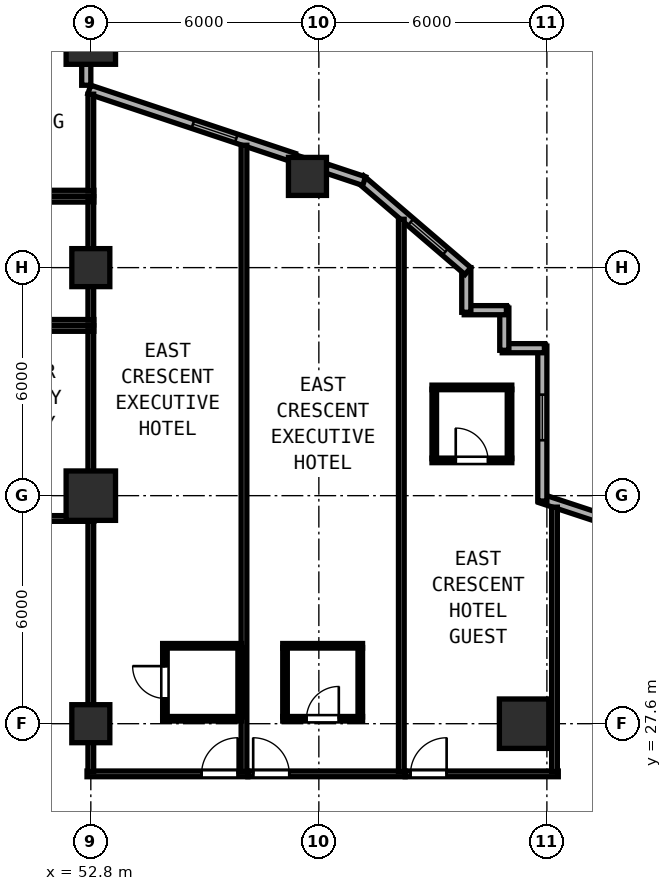
"""IFC4 building model, lengths in metres.
Left out: names, types, materials, properties, quantities, classifications, styles, units other than length and angle.
Written with IfcOpenShell. Run it as: python <this file> out.ifc"""

import sys

from ifc_helpers import new_model, si_unit, direction, frame, frame_2d, origin, origin_2d, place, context, subcontext, project, spatial, rectangle, hollow_rectangle, extrude, element, fill, save


model = new_model("IFC4")
c1 = context("Model", 3, precision=1e-05, world=origin(), true_north=direction((0.0, 1.0)))
c2 = subcontext(c1, "Body", "Model", "MODEL_VIEW")
j1 = project(units=[si_unit("LENGTHUNIT", "METRE"), si_unit("PLANEANGLEUNIT", "RADIAN")], contexts=[c1])
p1 = place(None, origin())
s1 = spatial("IfcSite", under=j1, at=p1, CompositionType="ELEMENT")
p2 = place(p1, origin())
s2 = spatial("IfcBuilding", under=s1, at=p2, CompositionType="ELEMENT")
p3 = place(p2, frame((0.0, 0.0, 39.2)))
s3 = spatial("IfcBuildingStorey", under=s2, at=p3, CompositionType="ELEMENT", Elevation=39.2)
for number, where, z_axis, x_axis in (
    (1, (52.8, 33.6, 0.0), (0.0, 0.0, 1.0), (1.0, 0.0, 0.0)),
    (2, (52.8, 45.6, 0.0), (0.0, 0.0, 1.0), (1.0, 0.0, 0.0)),
    (3, (64.2, 27.6, 0.0), (0.0, 0.0, 1.0), (1.0, 0.0, 0.0)),
):
    element("IfcColumn", number, at=place(p3, frame(where, z_axis=z_axis, x_axis=x_axis)), inside=s3, PredefinedType="COLUMN", context=c2, shape_type="SweptSolid", body=[
        extrude(hollow_rectangle(XDim=1.3, YDim=1.3, WallThickness=0.048, at=origin_2d()), origin(), (0.0, 0.0, 1.0), 3.8),
    ])
for number, where, z_axis, x_axis in (
    (4, (52.8, 27.6, 0.0), (0.0, 0.0, 1.0), (1.0, 0.0, 0.0)),
    (5, (52.8, 39.6, 0.0), (0.0, 0.0, 1.0), (1.0, 0.0, 0.0)),
    (6, (58.5, 42.0, 0.0), (0.0, 0.0, 1.0), (1.0, 0.0, 0.0)),
):
    element("IfcColumn", number, at=place(p3, frame(where, z_axis=z_axis, x_axis=x_axis)), inside=s3, PredefinedType="COLUMN", context=c2, shape_type="SweptSolid", body=[
        extrude(hollow_rectangle(XDim=1.0, YDim=1.0, WallThickness=0.038, at=origin_2d()), origin(), (0.0, 0.0, 1.0), 3.8),
    ])
p4 = place(p3, frame((72.065, 31.079, 0.0), z_axis=(0.0, 0.0, 1.0), x_axis=(-0.949719438711, 0.313102200144, 0.0)))
e7 = element("IfcWall", 7, at=p4, inside=s3, PredefinedType="SOLIDWALL", context=c2, shape_type="SweptSolid", body=[
    extrude(rectangle(XDim=7.831, YDim=0.24, at=frame_2d((3.916, 0.0))), origin(), (0.0, 0.0, 1.0), 3.54),
])
p5 = place(p4, frame((1.6, 0.0, 0.85)))
e8 = element("IfcOpeningElement", 8, at=p5, cuts=e7, PredefinedType="OPENING", context=c2, shape_type="SweptSolid", body=[
    extrude(rectangle(XDim=1.2, YDim=1.85, at=frame_2d((0.6, 0.925))), frame((0.0, 0.13, 0.0), z_axis=(0.0, -1.0, 0.0), x_axis=(1.0, 0.0, 0.0)), (0.0, 0.0, 1.0), 0.26),
])
p6 = place(p3, frame((64.68, 33.458, 0.0), z_axis=(0.0, 0.0, 1.0), x_axis=(0.0, 1.0, 0.0)))
e9 = element("IfcWall", 9, at=p6, inside=s3, PredefinedType="SOLIDWALL", context=c2, shape_type="SweptSolid", body=[
    extrude(rectangle(XDim=4.077, YDim=0.24, at=frame_2d((2.038, 0.0))), origin(), (0.0, 0.0, 1.0), 3.54),
])
p7 = place(p6, frame((1.6, 0.0, 0.85)))
e10 = element("IfcOpeningElement", 10, at=p7, cuts=e9, PredefinedType="OPENING", context=c2, shape_type="SweptSolid", body=[
    extrude(rectangle(XDim=1.2, YDim=1.85, at=frame_2d((0.6, 0.925))), frame((0.0, 0.13, 0.0), z_axis=(0.0, -1.0, 0.0), x_axis=(1.0, 0.0, 0.0)), (0.0, 0.0, 1.0), 0.26),
])
p8 = place(p3, frame((64.735, 37.48, 0.0), z_axis=(0.0, 0.0, 1.0), x_axis=(-1.0, 0.0, 0.0)))
e11 = element("IfcWall", 11, at=p8, inside=s3, PredefinedType="SOLIDWALL", context=c2, shape_type="SweptSolid", body=[
    extrude(rectangle(XDim=1.11, YDim=0.24, at=frame_2d((0.555, 0.0))), origin(), (0.0, 0.0, 1.0), 3.54),
])
p9 = place(p3, frame((63.68, 37.425, 0.0), z_axis=(0.0, 0.0, 1.0), x_axis=(0.0, 1.0, 0.0)))
e12 = element("IfcWall", 12, at=p9, inside=s3, PredefinedType="SOLIDWALL", context=c2, shape_type="SweptSolid", body=[
    extrude(rectangle(XDim=1.11, YDim=0.24, at=frame_2d((0.555, 0.0))), origin(), (0.0, 0.0, 1.0), 3.54),
])
p10 = place(p3, frame((63.735, 38.48, 0.0), z_axis=(0.0, 0.0, 1.0), x_axis=(-1.0, 0.0, 0.0)))
e13 = element("IfcWall", 13, at=p10, inside=s3, PredefinedType="SOLIDWALL", context=c2, shape_type="SweptSolid", body=[
    extrude(rectangle(XDim=1.11, YDim=0.24, at=frame_2d((0.555, 0.0))), origin(), (0.0, 0.0, 1.0), 3.54),
])
p11 = place(p3, frame((62.68, 38.425, 0.0), z_axis=(0.0, 0.0, 1.0), x_axis=(0.0, 1.0, 0.0)))
e14 = element("IfcWall", 14, at=p11, inside=s3, PredefinedType="SOLIDWALL", context=c2, shape_type="SweptSolid", body=[
    extrude(rectangle(XDim=1.175, YDim=0.24, at=frame_2d((0.587, 0.0))), origin(), (0.0, 0.0, 1.0), 3.54),
])
p12 = place(p3, frame((62.722, 39.509, 0.0), z_axis=(0.0, 0.0, 1.0), x_axis=(-0.759247334792, 0.650802185469, 0.0)))
e15 = element("IfcWall", 15, at=p12, inside=s3, PredefinedType="SOLIDWALL", context=c2, shape_type="SweptSolid", body=[
    extrude(rectangle(XDim=3.719, YDim=0.24, at=frame_2d((1.86, 0.0))), origin(), (0.0, 0.0, 1.0), 3.54),
])
p13 = place(p12, frame((0.782, 0.0, 0.85)))
e16 = element("IfcOpeningElement", 16, at=p13, cuts=e15, PredefinedType="OPENING", context=c2, shape_type="SweptSolid", body=[
    extrude(rectangle(XDim=1.2, YDim=1.85, at=frame_2d((0.6, 0.925))), frame((0.0, 0.13, 0.0), z_axis=(0.0, -1.0, 0.0), x_axis=(1.0, 0.0, 0.0)), (0.0, 0.0, 1.0), 0.26),
])
p14 = place(p3, frame((59.992, 41.876, 0.0), z_axis=(0.0, 0.0, 1.0), x_axis=(-0.948706457285, 0.316158279832, 0.0)))
e17 = element("IfcWall", 17, at=p14, inside=s3, PredefinedType="SOLIDWALL", context=c2, shape_type="SweptSolid", body=[
    extrude(rectangle(XDim=1.054, YDim=0.24, at=frame_2d((0.527, 0.0))), origin(), (0.0, 0.0, 1.0), 3.54),
])
p15 = place(p3, frame((58.145, 42.492, 0.0), z_axis=(0.0, 0.0, 1.0), x_axis=(-0.948683298051, 0.316227766017, 0.0)))
e18 = element("IfcWall", 18, at=p15, inside=s3, PredefinedType="SOLIDWALL", context=c2, shape_type="SweptSolid", body=[
    extrude(rectangle(XDim=5.675, YDim=0.24, at=frame_2d((2.838, 0.0))), origin(), (0.0, 0.0, 1.0), 3.037),
])
p16 = place(p15, frame((1.6, 0.0, 0.85)))
e19 = element("IfcOpeningElement", 19, at=p16, cuts=e18, PredefinedType="OPENING", context=c2, shape_type="SweptSolid", body=[
    extrude(rectangle(XDim=1.2, YDim=1.85, at=frame_2d((0.6, 0.925))), frame((0.0, 0.13, 0.0), z_axis=(0.0, -1.0, 0.0), x_axis=(1.0, 0.0, 0.0)), (0.0, 0.0, 1.0), 0.26),
])
p17 = place(p3, frame((52.68, 44.398, 0.0), z_axis=(0.0, 0.0, 1.0), x_axis=(0.0, 1.0, 0.0)))
e20 = element("IfcWall", 20, at=p17, inside=s3, PredefinedType="SOLIDWALL", context=c2, shape_type="SweptSolid", body=[
    extrude(rectangle(XDim=0.56, YDim=0.24, at=frame_2d((0.28, 0.0))), origin(), (0.0, 0.0, 1.0), 3.037),
])
for number, where, z_axis, x_axis in (
    (21, (49.08, 38.0, 0.0), (0.0, 0.0, 1.0), (1.0, 0.0, 0.0)),
    (22, (49.08, 33.0, 0.0), (0.0, 0.0, 1.0), (1.0, 0.0, 0.0)),
):
    element("IfcWall", number, at=place(p3, frame(where, z_axis=z_axis, x_axis=x_axis)), inside=s3, PredefinedType="PARTITIONING", context=c2, shape_type="SweptSolid", body=[
        extrude(rectangle(XDim=3.8, YDim=0.15, at=frame_2d((1.9, 0.0))), origin(), (0.0, 0.0, 1.0), 3.54),
    ])
p18 = place(p3, frame((52.8, 33.06, 0.0), z_axis=(0.0, 0.0, 1.0), x_axis=(0.0, 1.0, 0.0)))
e23 = element("IfcWall", 23, at=p18, inside=s3, PredefinedType="PARTITIONING", context=c2, shape_type="SweptSolid", body=[
    extrude(rectangle(XDim=4.88, YDim=0.15, at=frame_2d((2.44, 0.0))), origin(), (0.0, 0.0, 1.0), 3.037),
])
for number, where, z_axis, x_axis in (
    (24, (49.08, 41.4, 0.0), (0.0, 0.0, 1.0), (1.0, 0.0, 0.0)),
    (25, (49.08, 38.16, 0.0), (0.0, 0.0, 1.0), (1.0, 0.0, 0.0)),
):
    element("IfcWall", number, at=place(p3, frame(where, z_axis=z_axis, x_axis=x_axis)), inside=s3, PredefinedType="PARTITIONING", context=c2, shape_type="SweptSolid", body=[
        extrude(rectangle(XDim=3.8, YDim=0.15, at=frame_2d((1.9, 0.0))), origin(), (0.0, 0.0, 1.0), 3.54),
    ])
p19 = place(p3, frame((52.8, 38.22, 0.0), z_axis=(0.0, 0.0, 1.0), x_axis=(0.0, 1.0, 0.0)))
e26 = element("IfcWall", 26, at=p19, inside=s3, PredefinedType="PARTITIONING", context=c2, shape_type="SweptSolid", body=[
    extrude(rectangle(XDim=3.12, YDim=0.15, at=frame_2d((1.56, 0.0))), origin(), (0.0, 0.0, 1.0), 3.037),
])
p20 = place(p3, frame((49.08, 41.56, 0.0), z_axis=(0.0, 0.0, 1.0), x_axis=(1.0, 0.0, 0.0)))
e27 = element("IfcWall", 27, at=p20, inside=s3, PredefinedType="PARTITIONING", context=c2, shape_type="SweptSolid", body=[
    extrude(rectangle(XDim=3.8, YDim=0.15, at=frame_2d((1.9, 0.0))), origin(), (0.0, 0.0, 1.0), 3.54),
])
p21 = place(p3, frame((52.8, 41.62, 0.0), z_axis=(0.0, 0.0, 1.0), x_axis=(0.0, 1.0, 0.0)))
e28 = element("IfcWall", 28, at=p21, inside=s3, PredefinedType="PARTITIONING", context=c2, shape_type="SweptSolid", body=[
    extrude(rectangle(XDim=2.543, YDim=0.15, at=frame_2d((1.271, 0.0))), origin(), (0.0, 0.0, 1.0), 3.037),
])
p22 = place(p3, frame((52.7, 26.28, 0.0), z_axis=(0.0, 0.0, 1.0), x_axis=(1.0, 0.0, 0.0)))
e29 = element("IfcWall", 29, at=p22, inside=s3, PredefinedType="PARTITIONING", context=c2, shape_type="SweptSolid", body=[
    extrude(rectangle(XDim=4.23, YDim=0.15, at=frame_2d((2.115, 0.0))), origin(), (0.0, 0.0, 1.0), 3.54),
])
p23 = place(p22, frame((3.014, 0.0, 0.0)))
e30 = element("IfcOpeningElement", 30, at=p23, cuts=e29, PredefinedType="OPENING", context=c2, shape_type="SweptSolid", body=[
    extrude(rectangle(XDim=0.95, YDim=2.18, at=frame_2d((0.475, 1.09))), frame((0.0, 0.085, 0.0), z_axis=(0.0, -1.0, 0.0), x_axis=(1.0, 0.0, 0.0)), (0.0, 0.0, 1.0), 0.17),
])
p24 = place(p3, frame((52.8, 26.34, 0.0), z_axis=(0.0, 0.0, 1.0), x_axis=(0.0, 1.0, 0.0)))
e31 = element("IfcWall", 31, at=p24, inside=s3, PredefinedType="PARTITIONING", context=c2, shape_type="SweptSolid", body=[
    extrude(rectangle(XDim=6.6, YDim=0.15, at=frame_2d((3.3, 0.0))), origin(), (0.0, 0.0, 1.0), 3.037),
])
p25 = place(p3, frame((56.83, 26.34, 0.0), z_axis=(0.0, 0.0, 1.0), x_axis=(0.0, 1.0, 0.0)))
e32 = element("IfcWall", 32, at=p25, inside=s3, PredefinedType="PARTITIONING", context=c2, shape_type="SweptSolid", body=[
    extrude(rectangle(XDim=16.479, YDim=0.15, at=frame_2d((8.24, 0.0))), origin(), (0.0, 0.0, 1.0), 3.54),
])
p26 = place(p3, frame((54.69, 29.65, 0.0), z_axis=(0.0, 0.0, 1.0), x_axis=(1.0, 0.0, 0.0)))
e33 = element("IfcWall", 33, at=p26, inside=s3, PredefinedType="PARTITIONING", context=c2, shape_type="SweptSolid", body=[
    extrude(rectangle(XDim=2.08, YDim=0.12, at=frame_2d((1.04, 0.0))), origin(), (0.0, 0.0, 1.0), 3.54),
])
p27 = place(p3, frame((54.69, 27.73, 0.0), z_axis=(0.0, 0.0, 1.0), x_axis=(1.0, 0.0, 0.0)))
e34 = element("IfcWall", 34, at=p27, inside=s3, PredefinedType="PARTITIONING", context=c2, shape_type="SweptSolid", body=[
    extrude(rectangle(XDim=2.08, YDim=0.12, at=frame_2d((1.04, 0.0))), origin(), (0.0, 0.0, 1.0), 3.037),
])
p28 = place(p3, frame((54.75, 27.775, 0.0), z_axis=(0.0, 0.0, 1.0), x_axis=(0.0, 1.0, 0.0)))
e35 = element("IfcWall", 35, at=p28, inside=s3, PredefinedType="PARTITIONING", context=c2, shape_type="SweptSolid", body=[
    extrude(rectangle(XDim=1.83, YDim=0.12, at=frame_2d((0.915, 0.0))), origin(), (0.0, 0.0, 1.0), 3.54),
])
p29 = place(p28, frame((1.34, 0.0, 0.0), z_axis=(0.0, 0.0, 1.0), x_axis=(-1.0, 0.0, 0.0)))
e36 = element("IfcOpeningElement", 36, at=p29, cuts=e35, PredefinedType="OPENING", context=c2, shape_type="SweptSolid", body=[
    extrude(rectangle(XDim=0.85, YDim=2.1, at=frame_2d((0.425, 1.05))), frame((0.0, 0.07, 0.0), z_axis=(0.0, -1.0, 0.0), x_axis=(1.0, 0.0, 0.0)), (0.0, 0.0, 1.0), 0.14),
])
p30 = place(p3, frame((56.73, 27.775, 0.0), z_axis=(0.0, 0.0, 1.0), x_axis=(0.0, 1.0, 0.0)))
e37 = element("IfcWall", 37, at=p30, inside=s3, PredefinedType="PARTITIONING", context=c2, shape_type="SweptSolid", body=[
    extrude(rectangle(XDim=1.83, YDim=0.12, at=frame_2d((0.915, 0.0))), origin(), (0.0, 0.0, 1.0), 3.54),
])
p31 = place(p3, frame((56.932, 26.28, 0.0), z_axis=(0.0, 0.0, 1.0), x_axis=(1.0, 0.0, 0.0)))
e38 = element("IfcWall", 38, at=p31, inside=s3, PredefinedType="PARTITIONING", context=c2, shape_type="SweptSolid", body=[
    extrude(rectangle(XDim=4.138, YDim=0.15, at=frame_2d((2.069, 0.0))), origin(), (0.0, 0.0, 1.0), 3.54),
])
p32 = place(p31, frame((0.14, 0.0, 0.0)))
e39 = element("IfcOpeningElement", 39, at=p32, cuts=e38, PredefinedType="OPENING", context=c2, shape_type="SweptSolid", body=[
    extrude(rectangle(XDim=0.95, YDim=2.18, at=frame_2d((0.475, 1.09))), frame((0.0, 0.085, 0.0), z_axis=(0.0, -1.0, 0.0), x_axis=(1.0, 0.0, 0.0)), (0.0, 0.0, 1.0), 0.17),
])
p33 = place(p3, frame((60.97, 26.34, 0.0), z_axis=(0.0, 0.0, 1.0), x_axis=(0.0, 1.0, 0.0)))
e40 = element("IfcWall", 40, at=p33, inside=s3, PredefinedType="PARTITIONING", context=c2, shape_type="SweptSolid", body=[
    extrude(rectangle(XDim=14.532, YDim=0.15, at=frame_2d((7.266, 0.0))), origin(), (0.0, 0.0, 1.0), 3.54),
])
p34 = place(p3, frame((57.85, 29.65, 0.0), z_axis=(0.0, 0.0, 1.0), x_axis=(1.0, 0.0, 0.0)))
e41 = element("IfcWall", 41, at=p34, inside=s3, PredefinedType="PARTITIONING", context=c2, shape_type="SweptSolid", body=[
    extrude(rectangle(XDim=2.1, YDim=0.12, at=frame_2d((1.05, 0.0))), origin(), (0.0, 0.0, 1.0), 3.54),
])
p35 = place(p3, frame((57.85, 27.73, 0.0), z_axis=(0.0, 0.0, 1.0), x_axis=(1.0, 0.0, 0.0)))
e42 = element("IfcWall", 42, at=p35, inside=s3, PredefinedType="PARTITIONING", context=c2, shape_type="SweptSolid", body=[
    extrude(rectangle(XDim=2.1, YDim=0.12, at=frame_2d((1.05, 0.0))), origin(), (0.0, 0.0, 1.0), 3.037),
])
p36 = place(p35, frame((0.625, 0.0, 0.0)))
e43 = element("IfcOpeningElement", 43, at=p36, cuts=e42, PredefinedType="OPENING", context=c2, shape_type="SweptSolid", body=[
    extrude(rectangle(XDim=0.85, YDim=2.1, at=frame_2d((0.425, 1.05))), frame((0.0, 0.07, 0.0), z_axis=(0.0, -1.0, 0.0), x_axis=(1.0, 0.0, 0.0)), (0.0, 0.0, 1.0), 0.14),
])
for number, where, z_axis, x_axis in (
    (44, (57.91, 27.775, 0.0), (0.0, 0.0, 1.0), (0.0, 1.0, 0.0)),
    (45, (59.89, 27.775, 0.0), (0.0, 0.0, 1.0), (0.0, 1.0, 0.0)),
):
    element("IfcWall", number, at=place(p3, frame(where, z_axis=z_axis, x_axis=x_axis)), inside=s3, PredefinedType="PARTITIONING", context=c2, shape_type="SweptSolid", body=[
        extrude(rectangle(XDim=1.83, YDim=0.12, at=frame_2d((0.915, 0.0))), origin(), (0.0, 0.0, 1.0), 3.54),
    ])
p37 = place(p3, frame((61.072, 26.28, 0.0), z_axis=(0.0, 0.0, 1.0), x_axis=(1.0, 0.0, 0.0)))
e46 = element("IfcWall", 46, at=p37, inside=s3, PredefinedType="PARTITIONING", context=c2, shape_type="SweptSolid", body=[
    extrude(rectangle(XDim=4.028, YDim=0.15, at=frame_2d((2.014, 0.0))), origin(), (0.0, 0.0, 1.0), 3.54),
])
p38 = place(p37, frame((0.14, 0.0, 0.0)))
e47 = element("IfcOpeningElement", 47, at=p38, cuts=e46, PredefinedType="OPENING", context=c2, shape_type="SweptSolid", body=[
    extrude(rectangle(XDim=0.95, YDim=2.15, at=frame_2d((0.475, 1.075))), frame((0.0, 0.085, 0.0), z_axis=(0.0, -1.0, 0.0), x_axis=(1.0, 0.0, 0.0)), (0.0, 0.0, 1.0), 0.17),
])
p39 = place(p3, frame((65.0, 26.34, 0.0), z_axis=(0.0, 0.0, 1.0), x_axis=(0.0, 1.0, 0.0)))
e48 = element("IfcWall", 48, at=p39, inside=s3, PredefinedType="PARTITIONING", context=c2, shape_type="SweptSolid", body=[
    extrude(rectangle(XDim=6.957, YDim=0.15, at=frame_2d((3.479, 0.0))), origin(), (0.0, 0.0, 1.0), 3.54),
])
p40 = place(p3, frame((61.777, 36.448, 0.0), z_axis=(0.0, 0.0, 1.0), x_axis=(1.0, 0.0, 0.0)))
e49 = element("IfcWall", 49, at=p40, inside=s3, PredefinedType="PARTITIONING", context=c2, shape_type="SweptSolid", body=[
    extrude(rectangle(XDim=2.1, YDim=0.12, at=frame_2d((1.05, 0.0))), origin(), (0.0, 0.0, 1.0), 3.54),
])
p41 = place(p3, frame((61.777, 34.528, 0.0), z_axis=(0.0, 0.0, 1.0), x_axis=(1.0, 0.0, 0.0)))
e50 = element("IfcWall", 50, at=p41, inside=s3, PredefinedType="PARTITIONING", context=c2, shape_type="SweptSolid", body=[
    extrude(rectangle(XDim=2.1, YDim=0.12, at=frame_2d((1.05, 0.0))), origin(), (0.0, 0.0, 1.0), 3.54),
])
p42 = place(p41, frame((0.625, 0.0, 0.0)))
e51 = element("IfcOpeningElement", 51, at=p42, cuts=e50, PredefinedType="OPENING", context=c2, shape_type="SweptSolid", body=[
    extrude(rectangle(XDim=0.85, YDim=2.1, at=frame_2d((0.425, 1.05))), frame((0.0, 0.07, 0.0), z_axis=(0.0, -1.0, 0.0), x_axis=(1.0, 0.0, 0.0)), (0.0, 0.0, 1.0), 0.14),
])
for number, where, z_axis, x_axis in (
    (52, (61.837, 34.573, 0.0), (0.0, 0.0, 1.0), (0.0, 1.0, 0.0)),
    (53, (63.817, 34.573, 0.0), (0.0, 0.0, 1.0), (0.0, 1.0, 0.0)),
):
    element("IfcWall", number, at=place(p3, frame(where, z_axis=z_axis, x_axis=x_axis)), inside=s3, PredefinedType="PARTITIONING", context=c2, shape_type="SweptSolid", body=[
        extrude(rectangle(XDim=1.83, YDim=0.12, at=frame_2d((0.915, 0.0))), origin(), (0.0, 0.0, 1.0), 3.54),
    ])
p43 = place(p7, origin())
e54 = element("IfcWindow", 54, at=p43, inside=s3, PartitioningType="SINGLE_PANEL", PredefinedType="WINDOW", context=c2, shape_type="SweptSolid", body=[
    extrude(rectangle(XDim=1.2, YDim=1.85, at=frame_2d((0.6, 0.925))), frame((0.0, 0.03, 0.0), z_axis=(0.0, -1.0, 0.0), x_axis=(1.0, 0.0, 0.0)), (0.0, 0.0, 1.0), 0.06),
])
fill(e10, e54)
p44 = place(p13, origin())
e55 = element("IfcWindow", 55, at=p44, inside=s3, PartitioningType="SINGLE_PANEL", PredefinedType="WINDOW", context=c2, shape_type="SweptSolid", body=[
    extrude(rectangle(XDim=1.2, YDim=1.85, at=frame_2d((0.6, 0.925))), frame((0.0, 0.03, 0.0), z_axis=(0.0, -1.0, 0.0), x_axis=(1.0, 0.0, 0.0)), (0.0, 0.0, 1.0), 0.06),
])
fill(e16, e55)
p45 = place(p16, origin())
e56 = element("IfcWindow", 56, at=p45, inside=s3, PartitioningType="SINGLE_PANEL", PredefinedType="WINDOW", context=c2, shape_type="SweptSolid", body=[
    extrude(rectangle(XDim=1.2, YDim=1.85, at=frame_2d((0.6, 0.925))), frame((0.0, 0.03, 0.0), z_axis=(0.0, -1.0, 0.0), x_axis=(1.0, 0.0, 0.0)), (0.0, 0.0, 1.0), 0.06),
])
fill(e19, e56)
p46 = place(p23, origin())
e57 = element("IfcDoor", 57, at=p46, inside=s3, OperationType="SINGLE_SWING_RIGHT", PredefinedType="DOOR", context=c2, shape_type="SweptSolid", body=[
    extrude(rectangle(XDim=0.95, YDim=2.18, at=frame_2d((0.475, 1.09))), frame((0.0, 0.025, 0.0), z_axis=(0.0, -1.0, 0.0), x_axis=(1.0, 0.0, 0.0)), (0.0, 0.0, 1.0), 0.05),
])
fill(e30, e57)
p47 = place(p29, origin())
e58 = element("IfcDoor", 58, at=p47, inside=s3, OperationType="SINGLE_SWING_LEFT", PredefinedType="DOOR", context=c2, shape_type="SweptSolid", body=[
    extrude(rectangle(XDim=0.85, YDim=2.1, at=frame_2d((0.425, 1.05))), frame((0.0, 0.025, 0.0), z_axis=(0.0, -1.0, 0.0), x_axis=(1.0, 0.0, 0.0)), (0.0, 0.0, 1.0), 0.05),
])
fill(e36, e58)
p48 = place(p32, origin())
e59 = element("IfcDoor", 59, at=p48, inside=s3, OperationType="SINGLE_SWING_LEFT", PredefinedType="DOOR", context=c2, shape_type="SweptSolid", body=[
    extrude(rectangle(XDim=0.95, YDim=2.18, at=frame_2d((0.475, 1.09))), frame((0.0, 0.025, 0.0), z_axis=(0.0, -1.0, 0.0), x_axis=(1.0, 0.0, 0.0)), (0.0, 0.0, 1.0), 0.05),
])
fill(e39, e59)
p49 = place(p36, origin())
e60 = element("IfcDoor", 60, at=p49, inside=s3, OperationType="SINGLE_SWING_RIGHT", PredefinedType="DOOR", context=c2, shape_type="SweptSolid", body=[
    extrude(rectangle(XDim=0.85, YDim=2.1, at=frame_2d((0.425, 1.05))), frame((0.0, 0.025, 0.0), z_axis=(0.0, -1.0, 0.0), x_axis=(1.0, 0.0, 0.0)), (0.0, 0.0, 1.0), 0.05),
])
fill(e43, e60)
p50 = place(p38, origin())
e61 = element("IfcDoor", 61, at=p50, inside=s3, OperationType="SINGLE_SWING_RIGHT", PredefinedType="DOOR", context=c2, shape_type="SweptSolid", body=[
    extrude(rectangle(XDim=0.95, YDim=2.15, at=frame_2d((0.475, 1.075))), frame((0.0, 0.025, 0.0), z_axis=(0.0, -1.0, 0.0), x_axis=(1.0, 0.0, 0.0)), (0.0, 0.0, 1.0), 0.05),
])
fill(e47, e61)
p51 = place(p42, origin())
e62 = element("IfcDoor", 62, at=p51, inside=s3, OperationType="SINGLE_SWING_LEFT", PredefinedType="DOOR", context=c2, shape_type="SweptSolid", body=[
    extrude(rectangle(XDim=0.85, YDim=2.1, at=frame_2d((0.425, 1.05))), frame((0.0, 0.025, 0.0), z_axis=(0.0, -1.0, 0.0), x_axis=(1.0, 0.0, 0.0)), (0.0, 0.0, 1.0), 0.05),
])
fill(e51, e62)
save(model, sys.argv[1])
